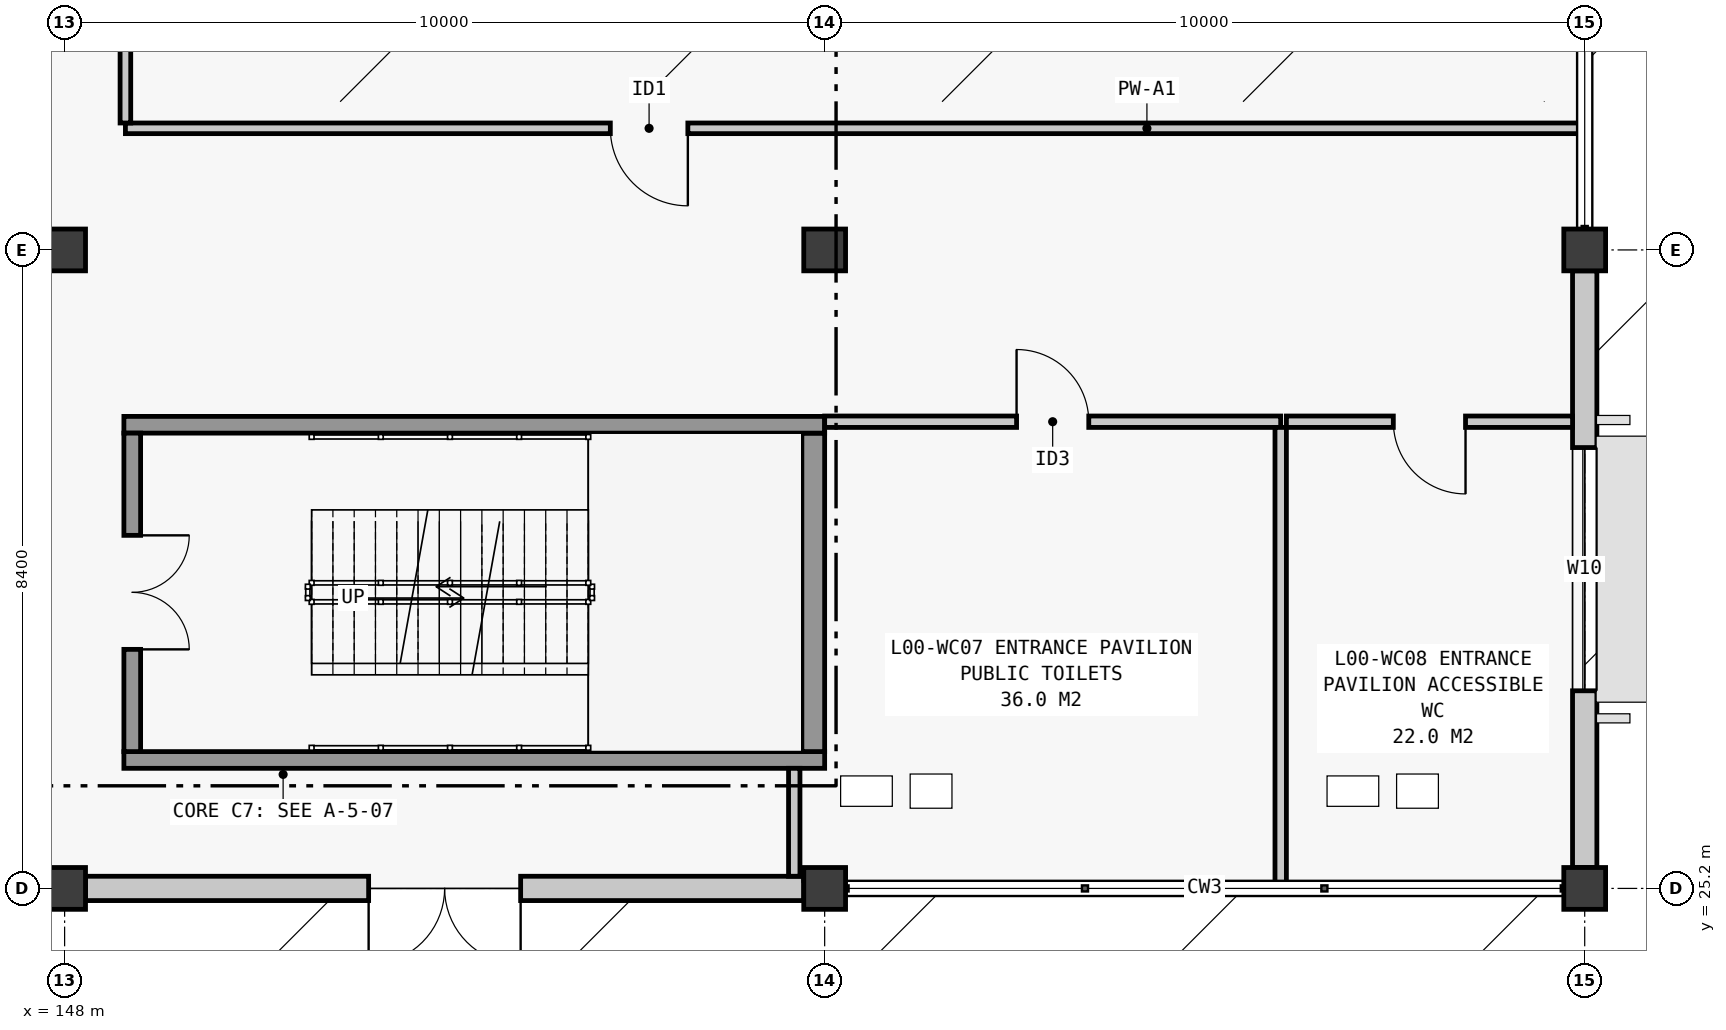
"""IFC4 building model, lengths in metres.
Left out: names, types, materials, properties, quantities, classifications, styles, units other than length and angle.
Written with IfcOpenShell. Run it as: python <this file> out.ifc"""

import sys

from ifc_helpers import new_model, si_unit, direction, frame, frame_2d, origin, origin_2d, place, context, subcontext, project, spatial, rectangle, extrude, element, fill, save


model = new_model("IFC4")
c1 = context("Model", 3, precision=1e-05, world=origin(), true_north=direction((0.0, 1.0)))
c2 = subcontext(c1, "Body", "Model", "MODEL_VIEW")
j1 = project(units=[si_unit("LENGTHUNIT", "METRE"), si_unit("PLANEANGLEUNIT", "RADIAN")], contexts=[c1])
p1 = place(None, origin())
s1 = spatial("IfcSite", under=j1, at=p1, CompositionType="ELEMENT")
p2 = place(p1, origin())
s2 = spatial("IfcBuilding", under=s1, at=p2, CompositionType="ELEMENT")
p3 = place(p2, origin())
s3 = spatial("IfcBuildingStorey", under=s2, at=p3, CompositionType="ELEMENT", Elevation=0.0)
for number, where, z_axis, x_axis in (
    (1, (148.0, 25.2, 0.0), (0.0, 0.0, 1.0), (1.0, 0.0, 0.0)),
    (2, (148.0, 33.6, 0.0), (0.0, 0.0, 1.0), (1.0, 0.0, 0.0)),
    (3, (158.0, 25.2, 0.0), (0.0, 0.0, 1.0), (1.0, 0.0, 0.0)),
    (4, (158.0, 33.6, 0.0), (0.0, 0.0, 1.0), (1.0, 0.0, 0.0)),
    (5, (168.0, 25.2, 0.0), (0.0, 0.0, 1.0), (1.0, 0.0, 0.0)),
    (6, (168.0, 33.6, 0.0), (0.0, 0.0, 1.0), (1.0, 0.0, 0.0)),
):
    element("IfcColumn", number, at=place(p3, frame(where, z_axis=z_axis, x_axis=x_axis)), inside=s3, PredefinedType="COLUMN", context=c2, shape_type="SweptSolid", body=[
        extrude(rectangle(XDim=0.55, YDim=0.55, at=origin_2d()), origin(), (0.0, 0.0, 1.0), 4.8),
    ])
p4 = place(p3, frame((148.275, 25.2, 0.0), z_axis=(0.0, 0.0, 1.0), x_axis=(1.0, 0.0, 0.0)))
e7 = element("IfcWall", 7, at=p4, inside=s3, PredefinedType="STANDARD", context=c2, shape_type="SweptSolid", body=[
    extrude(rectangle(XDim=9.45, YDim=0.32, at=frame_2d((4.725, 0.0))), origin(), (0.0, 0.0, 1.0), 4.216),
])
p5 = place(p4, frame((3.725, 0.0, 0.0)))
e8 = element("IfcOpeningElement", 8, at=p5, cuts=e7, PredefinedType="OPENING", context=c2, shape_type="SweptSolid", body=[
    extrude(rectangle(XDim=2.0, YDim=2.4, at=frame_2d((1.0, 1.2))), frame((0.0, 0.175, 0.0), z_axis=(0.0, -1.0, 0.0), x_axis=(1.0, 0.0, 0.0)), (0.0, 0.0, 1.0), 0.35),
])
p6 = place(p3, frame((168.0, 25.475, 0.0), z_axis=(0.0, 0.0, 1.0), x_axis=(0.0, 1.0, 0.0)))
e9 = element("IfcWall", 9, at=p6, inside=s3, PredefinedType="STANDARD", context=c2, shape_type="SweptSolid", body=[
    extrude(rectangle(XDim=7.85, YDim=0.32, at=frame_2d((3.925, 0.0))), origin(), (0.0, 0.0, 1.0), 3.976),
])
p7 = place(p6, frame((2.325, 0.0, 0.95)))
e10 = element("IfcOpeningElement", 10, at=p7, cuts=e9, PredefinedType="OPENING", context=c2, shape_type="SweptSolid", body=[
    extrude(rectangle(XDim=3.2, YDim=1.6, at=frame_2d((1.6, 0.8))), frame((0.0, 0.175, 0.0), z_axis=(0.0, -1.0, 0.0), x_axis=(1.0, 0.0, 0.0)), (0.0, 0.0, 1.0), 0.35),
])
p8 = place(p3, frame((148.78, 26.89, 0.0), z_axis=(0.0, 0.0, 1.0), x_axis=(1.0, 0.0, 0.0)))
e11 = element("IfcWall", 11, at=p8, inside=s3, PredefinedType="SOLIDWALL", context=c2, shape_type="SweptSolid", body=[
    extrude(rectangle(XDim=9.22, YDim=0.22, at=frame_2d((4.61, 0.0))), origin(), (0.0, 0.0, 1.0), 4.52),
])
p9 = place(p3, frame((157.85, 27.0, 0.0), z_axis=(0.0, 0.0, 1.0), x_axis=(0.0, 1.0, 0.0)))
e12 = element("IfcWall", 12, at=p9, inside=s3, PredefinedType="SHEAR", context=c2, shape_type="SweptSolid", body=[
    extrude(rectangle(XDim=4.19, YDim=0.3, at=frame_2d((2.095, 0.0))), origin(), (0.0, 0.0, 1.0), 4.52),
])
p10 = place(p3, frame((158.0, 31.3, 0.0), z_axis=(0.0, 0.0, 1.0), x_axis=(-1.0, 0.0, 0.0)))
e13 = element("IfcWall", 13, at=p10, inside=s3, PredefinedType="SOLIDWALL", context=c2, shape_type="SweptSolid", body=[
    extrude(rectangle(XDim=9.22, YDim=0.22, at=frame_2d((4.61, 0.0))), origin(), (0.0, 0.0, 1.0), 4.52),
])
p11 = place(p3, frame((148.89, 31.19, 0.0), z_axis=(0.0, 0.0, 1.0), x_axis=(0.0, -1.0, 0.0)))
e14 = element("IfcWall", 14, at=p11, inside=s3, PredefinedType="SOLIDWALL", context=c2, shape_type="SweptSolid", body=[
    extrude(rectangle(XDim=4.19, YDim=0.22, at=frame_2d((2.095, 0.0))), origin(), (0.0, 0.0, 1.0), 4.52),
])
p12 = place(p11, frame((1.345, 0.0, 0.0)))
e15 = element("IfcOpeningElement", 15, at=p12, cuts=e14, PredefinedType="OPENING", context=c2, shape_type="SweptSolid", body=[
    extrude(rectangle(XDim=1.5, YDim=2.2, at=frame_2d((0.75, 1.1))), frame((0.0, 0.125, 0.0), z_axis=(0.0, -1.0, 0.0), x_axis=(1.0, 0.0, 0.0)), (0.0, 0.0, 1.0), 0.25),
])
p13 = place(p3, frame((148.8, 35.2, 0.0), z_axis=(0.0, 0.0, 1.0), x_axis=(1.0, 0.0, 0.0)))
e16 = element("IfcWall", 16, at=p13, inside=s3, PredefinedType="PARTITIONING", context=c2, shape_type="SweptSolid", body=[
    extrude(rectangle(XDim=19.18, YDim=0.14, at=frame_2d((9.59, 0.0))), origin(), (0.0, 0.0, 1.0), 4.52),
])
p14 = place(p13, frame((6.38, 0.0, 0.0)))
e17 = element("IfcOpeningElement", 17, at=p14, cuts=e16, PredefinedType="OPENING", context=c2, shape_type="SweptSolid", body=[
    extrude(rectangle(XDim=1.02, YDim=2.15, at=frame_2d((0.51, 1.075))), frame((0.0, 0.085, 0.0), z_axis=(0.0, -1.0, 0.0), x_axis=(1.0, 0.0, 0.0)), (0.0, 0.0, 1.0), 0.17),
])
p15 = place(p3, frame((148.8, 35.27, 0.0), z_axis=(0.0, 0.0, 1.0), x_axis=(0.0, 1.0, 0.0)))
e18 = element("IfcWall", 18, at=p15, inside=s3, PredefinedType="PARTITIONING", context=c2, shape_type="SweptSolid", body=[
    extrude(rectangle(XDim=6.66, YDim=0.14, at=frame_2d((3.33, 0.0))), origin(), (0.0, 0.0, 1.0), 4.52),
])
p16 = place(p3, frame((158.0, 31.34, 0.0), z_axis=(0.0, 0.0, 1.0), x_axis=(1.0, 0.0, 0.0)))
e19 = element("IfcWall", 19, at=p16, inside=s3, PredefinedType="PLUMBINGWALL", context=c2, shape_type="SweptSolid", body=[
    extrude(rectangle(XDim=6.0, YDim=0.15, at=frame_2d((3.0, 0.0))), origin(), (0.0, 0.0, 1.0), 4.52),
])
p17 = place(p16, frame((2.525, 0.0, 0.0)))
e20 = element("IfcOpeningElement", 20, at=p17, cuts=e19, PredefinedType="OPENING", context=c2, shape_type="SweptSolid", body=[
    extrude(rectangle(XDim=0.95, YDim=2.1, at=frame_2d((0.475, 1.05))), frame((0.0, 0.09, 0.0), z_axis=(0.0, -1.0, 0.0), x_axis=(1.0, 0.0, 0.0)), (0.0, 0.0, 1.0), 0.18),
])
p18 = place(p3, frame((157.725, 25.38, 0.0), z_axis=(0.0, 0.0, 1.0), x_axis=(1.0, 0.0, 0.0)))
e21 = element("IfcWall", 21, at=p18, inside=s3, PredefinedType="PLUMBINGWALL", context=c2, shape_type="SweptSolid", body=[
    extrude(rectangle(XDim=0.55, YDim=0.15, at=frame_2d((0.275, 0.0))), origin(), (0.0, 0.0, 1.0), 4.52),
])
p19 = place(p3, frame((157.6, 25.36, 0.0), z_axis=(0.0, 0.0, 1.0), x_axis=(0.0, 1.0, 0.0)))
e22 = element("IfcWall", 22, at=p19, inside=s3, PredefinedType="PLUMBINGWALL", context=c2, shape_type="SweptSolid", body=[
    extrude(rectangle(XDim=1.42, YDim=0.15, at=frame_2d((0.71, 0.0))), origin(), (0.0, 0.0, 1.0), 4.52),
])
p20 = place(p3, frame((164.0, 25.22, 0.0), z_axis=(0.0, 0.0, 1.0), x_axis=(0.0, 1.0, 0.0)))
e23 = element("IfcWall", 23, at=p20, inside=s3, PredefinedType="PLUMBINGWALL", context=c2, shape_type="SweptSolid", body=[
    extrude(rectangle(XDim=6.045, YDim=0.15, at=frame_2d((3.022, 0.0))), origin(), (0.0, 0.0, 1.0), 4.52),
])
p21 = place(p3, frame((164.075, 31.34, 0.0), z_axis=(0.0, 0.0, 1.0), x_axis=(1.0, 0.0, 0.0)))
e24 = element("IfcWall", 24, at=p21, inside=s3, PredefinedType="PLUMBINGWALL", context=c2, shape_type="SweptSolid", body=[
    extrude(rectangle(XDim=3.765, YDim=0.15, at=frame_2d((1.883, 0.0))), origin(), (0.0, 0.0, 1.0), 4.52),
])
p22 = place(p21, frame((1.407, 0.0, 0.0)))
e25 = element("IfcOpeningElement", 25, at=p22, cuts=e24, PredefinedType="OPENING", context=c2, shape_type="SweptSolid", body=[
    extrude(rectangle(XDim=0.95, YDim=2.1, at=frame_2d((0.475, 1.05))), frame((0.0, 0.09, 0.0), z_axis=(0.0, -1.0, 0.0), x_axis=(1.0, 0.0, 0.0)), (0.0, 0.0, 1.0), 0.18),
])
p23 = place(p5, frame((2.0, 0.0, 0.0), z_axis=(0.0, 0.0, 1.0), x_axis=(-1.0, 0.0, 0.0)))
e26 = element("IfcDoor", 26, at=p23, inside=s3, OperationType="DOUBLE_DOOR_SINGLE_SWING", PredefinedType="DOOR", context=c2, shape_type="SweptSolid", body=[
    extrude(rectangle(XDim=2.0, YDim=2.4, at=frame_2d((1.0, 1.2))), frame((0.0, 0.025, 0.0), z_axis=(0.0, -1.0, 0.0), x_axis=(1.0, 0.0, 0.0)), (0.0, 0.0, 1.0), 0.05),
])
fill(e8, e26)
p24 = place(p7, origin())
e27 = element("IfcWindow", 27, at=p24, inside=s3, PartitioningType="SINGLE_PANEL", PredefinedType="WINDOW", context=c2, shape_type="SweptSolid", body=[
    extrude(rectangle(XDim=3.2, YDim=1.6, at=frame_2d((1.6, 0.8))), frame((0.0, 0.03, 0.0), z_axis=(0.0, -1.0, 0.0), x_axis=(1.0, 0.0, 0.0)), (0.0, 0.0, 1.0), 0.06),
])
fill(e10, e27)
p25 = place(p12, origin())
e28 = element("IfcDoor", 28, at=p25, inside=s3, OperationType="DOUBLE_DOOR_SINGLE_SWING", PredefinedType="DOOR", context=c2, shape_type="SweptSolid", body=[
    extrude(rectangle(XDim=1.5, YDim=2.2, at=frame_2d((0.75, 1.1))), frame((0.0, 0.025, 0.0), z_axis=(0.0, -1.0, 0.0), x_axis=(1.0, 0.0, 0.0)), (0.0, 0.0, 1.0), 0.05),
])
fill(e15, e28)
p26 = place(p14, frame((1.02, 0.0, 0.0), z_axis=(0.0, 0.0, 1.0), x_axis=(-1.0, 0.0, 0.0)))
e29 = element("IfcDoor", 29, at=p26, inside=s3, OperationType="SINGLE_SWING_RIGHT", PredefinedType="DOOR", context=c2, shape_type="SweptSolid", body=[
    extrude(rectangle(XDim=1.02, YDim=2.15, at=frame_2d((0.51, 1.075))), frame((0.0, 0.025, 0.0), z_axis=(0.0, -1.0, 0.0), x_axis=(1.0, 0.0, 0.0)), (0.0, 0.0, 1.0), 0.05),
])
fill(e17, e29)
p27 = place(p17, origin())
e30 = element("IfcDoor", 30, at=p27, inside=s3, OperationType="SINGLE_SWING_LEFT", PredefinedType="DOOR", context=c2, shape_type="SweptSolid", body=[
    extrude(rectangle(XDim=0.95, YDim=2.1, at=frame_2d((0.475, 1.05))), frame((0.0, 0.025, 0.0), z_axis=(0.0, -1.0, 0.0), x_axis=(1.0, 0.0, 0.0)), (0.0, 0.0, 1.0), 0.05),
])
fill(e20, e30)
p28 = place(p22, frame((0.95, 0.0, 0.0), z_axis=(0.0, 0.0, 1.0), x_axis=(-1.0, 0.0, 0.0)))
e31 = element("IfcDoor", 31, at=p28, inside=s3, OperationType="SINGLE_SWING_RIGHT", PredefinedType="DOOR", context=c2, shape_type="SweptSolid", body=[
    extrude(rectangle(XDim=0.95, YDim=2.1, at=frame_2d((0.475, 1.05))), frame((0.0, 0.025, 0.0), z_axis=(0.0, -1.0, 0.0), x_axis=(1.0, 0.0, 0.0)), (0.0, 0.0, 1.0), 0.05),
])
fill(e25, e31)
save(model, sys.argv[1])
